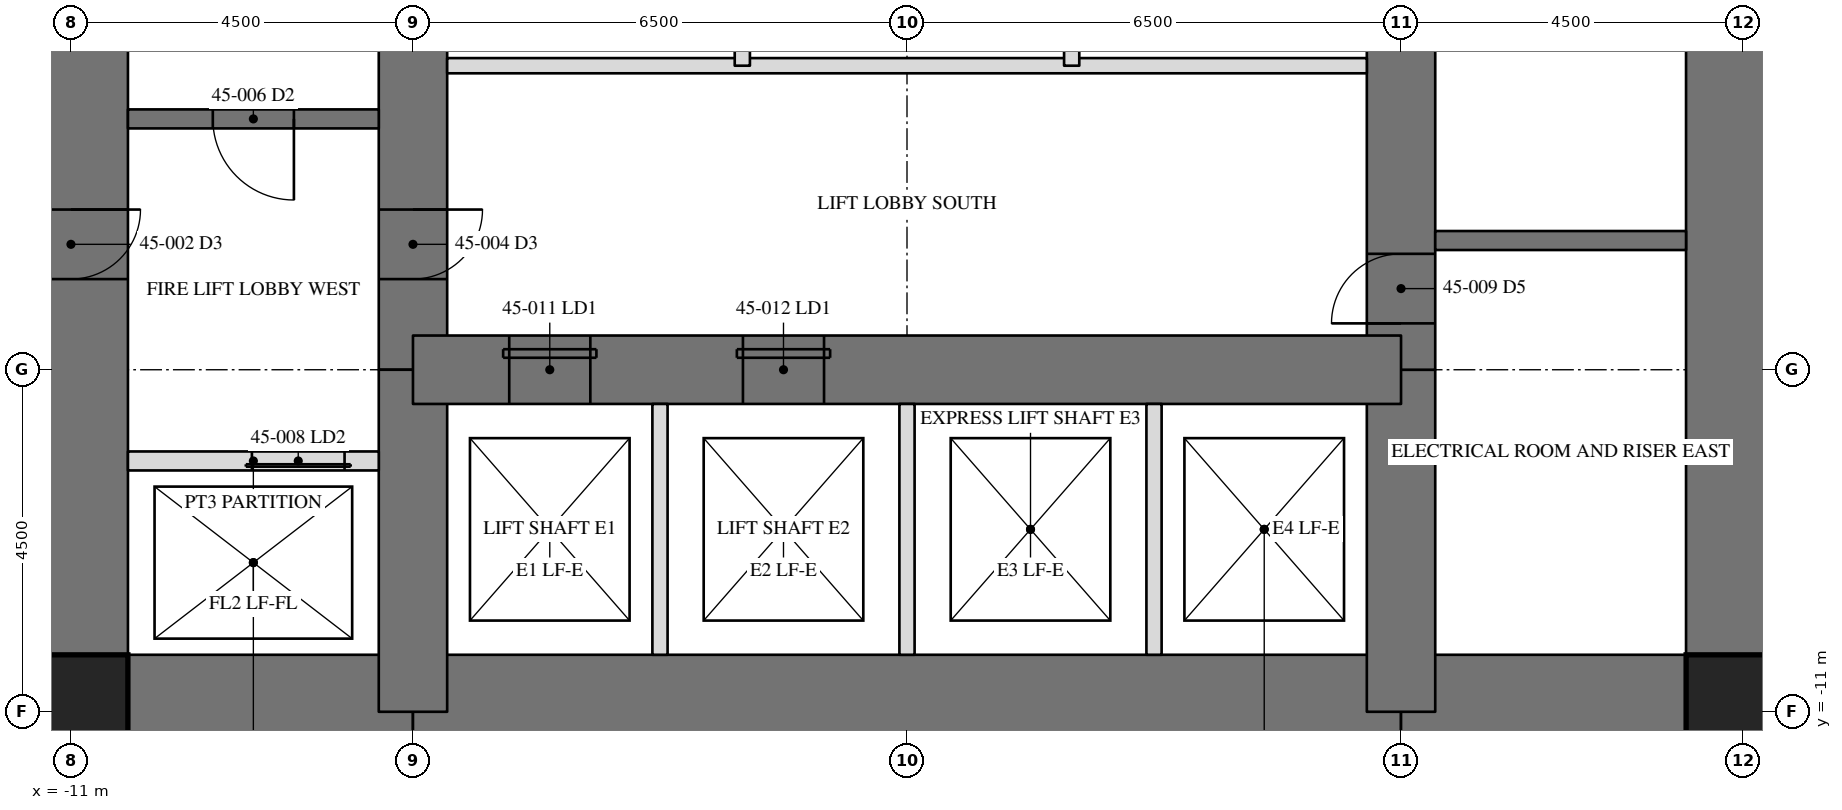
"""IFC4 building model, lengths in metres.
Left out: names, types, materials, properties, quantities, classifications, styles, units other than length and angle.
Written with IfcOpenShell. Run it as: python <this file> out.ifc"""

import sys

from ifc_helpers import new_model, si_unit, direction, frame, frame_2d, origin, origin_2d, place, context, subcontext, project, spatial, rectangle, hollow_rectangle, extrude, element, fill, save


model = new_model("IFC4")
c1 = context("Model", 3, precision=1e-05, world=origin(), true_north=direction((0.0, 1.0)))
c2 = subcontext(c1, "Body", "Model", "MODEL_VIEW")
j1 = project(units=[si_unit("LENGTHUNIT", "METRE"), si_unit("PLANEANGLEUNIT", "RADIAN")], contexts=[c1])
p1 = place(None, origin())
s1 = spatial("IfcSite", under=j1, at=p1, CompositionType="ELEMENT")
p2 = place(p1, origin())
s2 = spatial("IfcBuilding", under=s1, at=p2, CompositionType="ELEMENT")
p3 = place(p2, frame((0.0, 0.0, 194.2)))
s3 = spatial("IfcBuildingStorey", under=s2, at=p3, CompositionType="ELEMENT", Elevation=194.2)
p4 = place(p3, frame((11.0, -11.0, 0.0), z_axis=(0.0, 0.0, 1.0), x_axis=(0.0, 1.0, 0.0)))
e1 = element("IfcWall", 1, at=p4, inside=s3, PredefinedType="SHEAR", context=c2, shape_type="SweptSolid", body=[
    extrude(rectangle(XDim=22.0, YDim=1.5, at=frame_2d((11.0, 0.0))), origin(), (0.0, 0.0, 1.0), 3.5),
])
p5 = place(p4, frame((15.393, 0.0, 0.0)))
e2 = element("IfcOpeningElement", 2, at=p5, cuts=e1, PredefinedType="OPENING", context=c2, shape_type="SweptSolid", body=[
    extrude(rectangle(XDim=0.915, YDim=2.134, at=frame_2d((0.458, 1.067))), frame((0.0, 0.76, 0.0), z_axis=(0.0, -1.0, 0.0), x_axis=(1.0, 0.0, 0.0)), (0.0, 0.0, 1.0), 1.52),
])
p6 = place(p3, frame((-11.0, 11.0, 0.0), z_axis=(0.0, 0.0, 1.0), x_axis=(0.0, -1.0, 0.0)))
e3 = element("IfcWall", 3, at=p6, inside=s3, PredefinedType="SHEAR", context=c2, shape_type="SweptSolid", body=[
    extrude(rectangle(XDim=22.0, YDim=1.5, at=frame_2d((11.0, 0.0))), origin(), (0.0, 0.0, 1.0), 3.5),
])
p7 = place(p6, frame((15.393, 0.0, 0.0)))
e4 = element("IfcOpeningElement", 4, at=p7, cuts=e3, PredefinedType="OPENING", context=c2, shape_type="SweptSolid", body=[
    extrude(rectangle(XDim=0.915, YDim=2.134, at=frame_2d((0.458, 1.067))), frame((0.0, 0.76, 0.0), z_axis=(0.0, -1.0, 0.0), x_axis=(1.0, 0.0, 0.0)), (0.0, 0.0, 1.0), 1.52),
])
p8 = place(p3, frame((-11.0, -11.0, 0.0), z_axis=(0.0, 0.0, 1.0), x_axis=(1.0, 0.0, 0.0)))
e5 = element("IfcWall", 5, at=p8, inside=s3, PredefinedType="SHEAR", context=c2, shape_type="SweptSolid", body=[
    extrude(rectangle(XDim=4.5, YDim=1.5, at=frame_2d((2.25, 0.0))), origin(), (0.0, 0.0, 1.0), 3.5),
])
p9 = place(p3, frame((-6.5, -11.0, 0.0), z_axis=(0.0, 0.0, 1.0), x_axis=(1.0, 0.0, 0.0)))
e6 = element("IfcWall", 6, at=p9, inside=s3, PredefinedType="SHEAR", context=c2, shape_type="SweptSolid", body=[
    extrude(rectangle(XDim=13.0, YDim=1.5, at=frame_2d((6.5, 0.0))), origin(), (0.0, 0.0, 1.0), 3.5),
])
p10 = place(p3, frame((6.5, -11.0, 0.0), z_axis=(0.0, 0.0, 1.0), x_axis=(1.0, 0.0, 0.0)))
e7 = element("IfcWall", 7, at=p10, inside=s3, PredefinedType="SHEAR", context=c2, shape_type="SweptSolid", body=[
    extrude(rectangle(XDim=4.5, YDim=1.5, at=frame_2d((2.25, 0.0))), origin(), (0.0, 0.0, 1.0), 3.5),
])
p11 = place(p3, frame((6.5, -11.0, 0.0), z_axis=(0.0, 0.0, 1.0), x_axis=(0.0, 1.0, 0.0)))
e8 = element("IfcWall", 8, at=p11, inside=s3, PredefinedType="SHEAR", context=c2, shape_type="SweptSolid", body=[
    extrude(rectangle(XDim=4.5, YDim=0.9, at=frame_2d((2.25, 0.0))), origin(), (0.0, 0.0, 1.0), 3.5),
])
p12 = place(p3, frame((6.5, -6.5, 0.0), z_axis=(0.0, 0.0, 1.0), x_axis=(0.0, 1.0, 0.0)))
e9 = element("IfcWall", 9, at=p12, inside=s3, PredefinedType="SHEAR", context=c2, shape_type="SweptSolid", body=[
    extrude(rectangle(XDim=13.0, YDim=0.9, at=frame_2d((6.5, 0.0))), origin(), (0.0, 0.0, 1.0), 3.5),
])
p13 = place(p12, frame((10.893, 0.0, 0.0)))
e10 = element("IfcOpeningElement", 10, at=p13, cuts=e9, PredefinedType="OPENING", context=c2, shape_type="SweptSolid", body=[
    extrude(rectangle(XDim=0.915, YDim=2.134, at=frame_2d((0.458, 1.067))), frame((0.0, 0.46, 0.0), z_axis=(0.0, -1.0, 0.0), x_axis=(1.0, 0.0, 0.0)), (0.0, 0.0, 1.0), 0.92),
])
p14 = place(p12, frame((0.61, 0.0, 0.0)))
e11 = element("IfcOpeningElement", 11, at=p14, cuts=e9, PredefinedType="OPENING", context=c2, shape_type="SweptSolid", body=[
    extrude(rectangle(XDim=0.915, YDim=2.134, at=frame_2d((0.458, 1.067))), frame((0.0, 0.46, 0.0), z_axis=(0.0, -1.0, 0.0), x_axis=(1.0, 0.0, 0.0)), (0.0, 0.0, 1.0), 0.92),
])
p15 = place(p3, frame((-6.5, 6.5, 0.0), z_axis=(0.0, 0.0, 1.0), x_axis=(0.0, -1.0, 0.0)))
e12 = element("IfcWall", 12, at=p15, inside=s3, PredefinedType="SHEAR", context=c2, shape_type="SweptSolid", body=[
    extrude(rectangle(XDim=13.0, YDim=0.9, at=frame_2d((6.5, 0.0))), origin(), (0.0, 0.0, 1.0), 3.5),
])
p16 = place(p15, frame((10.893, 0.0, 0.0)))
e13 = element("IfcOpeningElement", 13, at=p16, cuts=e12, PredefinedType="OPENING", context=c2, shape_type="SweptSolid", body=[
    extrude(rectangle(XDim=0.915, YDim=2.134, at=frame_2d((0.458, 1.067))), frame((0.0, 0.46, 0.0), z_axis=(0.0, -1.0, 0.0), x_axis=(1.0, 0.0, 0.0)), (0.0, 0.0, 1.0), 0.92),
])
p17 = place(p15, frame((0.61, 0.0, 0.0)))
e14 = element("IfcOpeningElement", 14, at=p17, cuts=e12, PredefinedType="OPENING", context=c2, shape_type="SweptSolid", body=[
    extrude(rectangle(XDim=0.915, YDim=2.134, at=frame_2d((0.458, 1.067))), frame((0.0, 0.46, 0.0), z_axis=(0.0, -1.0, 0.0), x_axis=(1.0, 0.0, 0.0)), (0.0, 0.0, 1.0), 0.92),
])
p18 = place(p3, frame((-6.5, -6.5, 0.0), z_axis=(0.0, 0.0, 1.0), x_axis=(0.0, -1.0, 0.0)))
e15 = element("IfcWall", 15, at=p18, inside=s3, PredefinedType="SHEAR", context=c2, shape_type="SweptSolid", body=[
    extrude(rectangle(XDim=4.5, YDim=0.9, at=frame_2d((2.25, 0.0))), origin(), (0.0, 0.0, 1.0), 3.5),
])
p19 = place(p3, frame((-6.5, -6.5, 0.0), z_axis=(0.0, 0.0, 1.0), x_axis=(1.0, 0.0, 0.0)))
e16 = element("IfcWall", 16, at=p19, inside=s3, PredefinedType="SHEAR", context=c2, shape_type="SweptSolid", body=[
    extrude(rectangle(XDim=13.0, YDim=0.9, at=frame_2d((6.5, 0.0))), origin(), (0.0, 0.0, 1.0), 3.5),
])
p20 = place(p19, frame((1.267, 0.0, 0.0)))
e17 = element("IfcOpeningElement", 17, at=p20, cuts=e16, PredefinedType="OPENING", context=c2, shape_type="SweptSolid", body=[
    extrude(rectangle(XDim=1.067, YDim=2.134, at=frame_2d((0.533, 1.067))), frame((0.0, 0.46, 0.0), z_axis=(0.0, -1.0, 0.0), x_axis=(1.0, 0.0, 0.0)), (0.0, 0.0, 1.0), 0.92),
])
p21 = place(p19, frame((4.342, 0.0, 0.0)))
e18 = element("IfcOpeningElement", 18, at=p21, cuts=e16, PredefinedType="OPENING", context=c2, shape_type="SweptSolid", body=[
    extrude(rectangle(XDim=1.067, YDim=2.134, at=frame_2d((0.533, 1.067))), frame((0.0, 0.46, 0.0), z_axis=(0.0, -1.0, 0.0), x_axis=(1.0, 0.0, 0.0)), (0.0, 0.0, 1.0), 0.92),
])
for number, where, z_axis, x_axis in (
    (19, (-11.0, -11.0, 0.0), (0.0, 0.0, 1.0), (1.0, 0.0, 0.0)),
    (20, (11.0, -11.0, 0.0), (0.0, 0.0, 1.0), (1.0, 0.0, 0.0)),
):
    element("IfcColumn", number, at=place(p3, frame(where, z_axis=z_axis, x_axis=x_axis)), inside=s3, PredefinedType="COLUMN", context=c2, shape_type="SweptSolid", body=[
        extrude(hollow_rectangle(XDim=1.499, YDim=1.499, WallThickness=0.102, at=origin_2d()), origin(), (0.0, 0.0, 1.0), 3.5),
    ])
p22 = place(p3, frame((6.95, -4.8, 0.0), z_axis=(0.0, 0.0, 1.0), x_axis=(1.0, 0.0, 0.0)))
e21 = element("IfcWall", 21, at=p22, inside=s3, PredefinedType="SOLIDWALL", context=c2, shape_type="SweptSolid", body=[
    extrude(rectangle(XDim=3.3, YDim=0.25, at=frame_2d((1.65, 0.0))), origin(), (0.0, 0.0, 1.0), 3.31),
])
p23 = place(p3, frame((-6.95, -3.2, 0.0), z_axis=(0.0, 0.0, 1.0), x_axis=(-1.0, 0.0, 0.0)))
e22 = element("IfcWall", 22, at=p23, inside=s3, PredefinedType="SOLIDWALL", context=c2, shape_type="SweptSolid", body=[
    extrude(rectangle(XDim=3.3, YDim=0.25, at=frame_2d((1.65, 0.0))), origin(), (0.0, 0.0, 1.0), 3.31),
])
p24 = place(p23, frame((1.116, 0.0, 0.0)))
e23 = element("IfcOpeningElement", 23, at=p24, cuts=e22, PredefinedType="OPENING", context=c2, shape_type="SweptSolid", body=[
    extrude(rectangle(XDim=1.067, YDim=2.134, at=frame_2d((0.533, 1.067))), frame((0.0, 0.135, 0.0), z_axis=(0.0, -1.0, 0.0), x_axis=(1.0, 0.0, 0.0)), (0.0, 0.0, 1.0), 0.27),
])
p25 = place(p3, frame((-6.95, -7.7, 0.0), z_axis=(0.0, 0.0, 1.0), x_axis=(-1.0, 0.0, 0.0)))
e24 = element("IfcWall", 24, at=p25, inside=s3, PredefinedType="PARTITIONING", context=c2, shape_type="SweptSolid", body=[
    extrude(rectangle(XDim=3.3, YDim=0.25, at=frame_2d((1.65, 0.0))), origin(), (0.0, 0.0, 1.0), 3.31),
])
p26 = place(p25, frame((0.45, 0.0, 0.0)))
e25 = element("IfcOpeningElement", 25, at=p26, cuts=e24, PredefinedType="OPENING", context=c2, shape_type="SweptSolid", body=[
    extrude(rectangle(XDim=1.219, YDim=2.134, at=frame_2d((0.609, 1.067))), frame((0.0, 0.135, 0.0), z_axis=(0.0, -1.0, 0.0), x_axis=(1.0, 0.0, 0.0)), (0.0, 0.0, 1.0), 0.27),
])
p27 = place(p3, frame((6.05, -2.5, 0.0), z_axis=(0.0, 0.0, 1.0), x_axis=(-1.0, 0.0, 0.0)))
e26 = element("IfcWall", 26, at=p27, inside=s3, PredefinedType="PARTITIONING", context=c2, shape_type="SweptSolid", body=[
    extrude(rectangle(XDim=12.1, YDim=0.2, at=frame_2d((6.05, 0.0))), origin(), (0.0, 0.0, 1.0), 3.31),
])
for number, where, z_axis, x_axis in (
    (27, (-3.25, -10.25, 0.0), (0.0, 0.0, 1.0), (0.0, 1.0, 0.0)),
    (28, (0.0, -10.25, 0.0), (0.0, 0.0, 1.0), (0.0, 1.0, 0.0)),
    (29, (3.25, -10.25, 0.0), (0.0, 0.0, 1.0), (0.0, 1.0, 0.0)),
):
    element("IfcWall", number, at=place(p3, frame(where, z_axis=z_axis, x_axis=x_axis)), inside=s3, PredefinedType="PARTITIONING", context=c2, shape_type="SweptSolid", body=[
        extrude(rectangle(XDim=3.3, YDim=0.2, at=frame_2d((1.65, 0.0))), origin(), (0.0, 0.0, 1.0), 3.31),
    ])
for number, where, z_axis, x_axis in (
    (30, (-2.167, -2.5, 0.0), (0.0, 0.0, 1.0), (0.0, 1.0, 0.0)),
    (31, (2.167, -2.5, 0.0), (0.0, 0.0, 1.0), (0.0, 1.0, 0.0)),
):
    element("IfcWall", number, at=place(p3, frame(where, z_axis=z_axis, x_axis=x_axis)), inside=s3, PredefinedType="PARTITIONING", context=c2, shape_type="SweptSolid", body=[
        extrude(rectangle(XDim=5.0, YDim=0.2, at=frame_2d((2.5, 0.0))), origin(), (0.0, 0.0, 1.0), 3.31),
    ])
p28 = place(p16, origin())
e32 = element("IfcDoor", 32, at=p28, inside=s3, OperationType="SINGLE_SWING_RIGHT", PredefinedType="DOOR", context=c2, shape_type="SweptSolid", body=[
    extrude(rectangle(XDim=0.915, YDim=2.134, at=frame_2d((0.458, 1.067))), frame((0.0, -0.375, 0.0), z_axis=(0.0, -1.0, 0.0), x_axis=(1.0, 0.0, 0.0)), (0.0, 0.0, 1.0), 0.05),
])
fill(e13, e32)
p29 = place(p24, origin())
e33 = element("IfcDoor", 33, at=p29, inside=s3, OperationType="SINGLE_SWING_LEFT", PredefinedType="DOOR", context=c2, shape_type="SweptSolid", body=[
    extrude(rectangle(XDim=1.067, YDim=2.134, at=frame_2d((0.533, 1.067))), frame((0.0, 0.025, 0.0), z_axis=(0.0, -1.0, 0.0), x_axis=(1.0, 0.0, 0.0)), (0.0, 0.0, 1.0), 0.05),
])
fill(e23, e33)
p30 = place(p26, origin())
e34 = element("IfcDoor", 34, at=p30, inside=s3, OperationType="SLIDING_TO_LEFT", PredefinedType="DOOR", context=c2, shape_type="SweptSolid", body=[
    extrude(rectangle(XDim=1.219, YDim=2.134, at=frame_2d((0.609, 1.067))), frame((0.0, 0.025, 0.0), z_axis=(0.0, -1.0, 0.0), x_axis=(1.0, 0.0, 0.0)), (0.0, 0.0, 1.0), 0.05),
])
fill(e25, e34)
p31 = place(p14, origin())
e35 = element("IfcDoor", 35, at=p31, inside=s3, OperationType="SINGLE_SWING_RIGHT", PredefinedType="DOOR", context=c2, shape_type="SweptSolid", body=[
    extrude(rectangle(XDim=0.915, YDim=2.134, at=frame_2d((0.458, 1.067))), frame((0.0, -0.375, 0.0), z_axis=(0.0, -1.0, 0.0), x_axis=(1.0, 0.0, 0.0)), (0.0, 0.0, 1.0), 0.05),
])
fill(e11, e35)
p32 = place(p20, origin())
e36 = element("IfcDoor", 36, at=p32, inside=s3, OperationType="SLIDING_TO_LEFT", PredefinedType="DOOR", context=c2, shape_type="SweptSolid", body=[
    extrude(rectangle(XDim=1.067, YDim=2.134, at=frame_2d((0.533, 1.067))), frame((0.0, -0.375, 0.0), z_axis=(0.0, -1.0, 0.0), x_axis=(1.0, 0.0, 0.0)), (0.0, 0.0, 1.0), 0.05),
])
fill(e17, e36)
p33 = place(p21, origin())
e37 = element("IfcDoor", 37, at=p33, inside=s3, OperationType="SLIDING_TO_LEFT", PredefinedType="DOOR", context=c2, shape_type="SweptSolid", body=[
    extrude(rectangle(XDim=1.067, YDim=2.134, at=frame_2d((0.533, 1.067))), frame((0.0, -0.375, 0.0), z_axis=(0.0, -1.0, 0.0), x_axis=(1.0, 0.0, 0.0)), (0.0, 0.0, 1.0), 0.05),
])
fill(e18, e37)
save(model, sys.argv[1])
